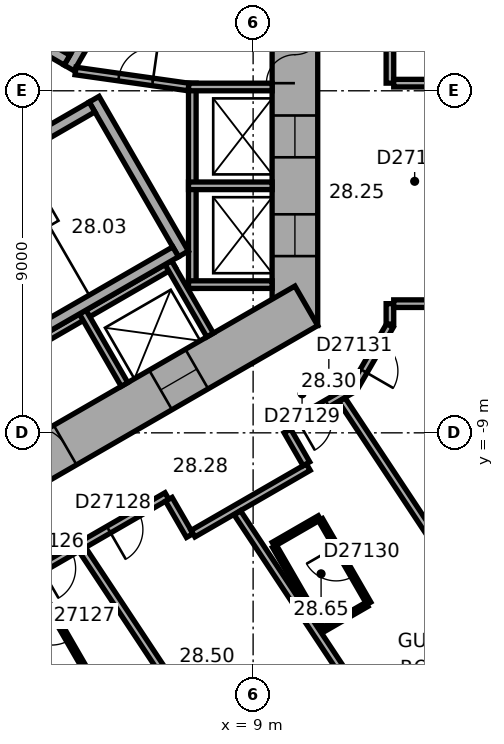
"""IFC4 building model, lengths in metres.
Left out: names, types, materials, properties, quantities, classifications, styles, units other than length and angle.
Written with IfcOpenShell. Run it as: python <this file> out.ifc"""

import sys

from ifc_helpers import new_model, si_unit, direction, frame, frame_2d, origin, place, context, subcontext, project, spatial, rectangle, extrude, element, fill, save


model = new_model("IFC4")
c1 = context("Model", 3, precision=1e-05, world=origin(), true_north=direction((0.0, 1.0)))
c2 = subcontext(c1, "Body", "Model", "MODEL_VIEW")
j1 = project(units=[si_unit("LENGTHUNIT", "METRE"), si_unit("PLANEANGLEUNIT", "RADIAN")], contexts=[c1])
p1 = place(None, origin())
s1 = spatial("IfcSite", under=j1, at=p1, CompositionType="ELEMENT")
p2 = place(p1, origin())
s2 = spatial("IfcBuilding", under=s1, at=p2, CompositionType="ELEMENT")
p3 = place(p2, frame((0.0, 0.0, 116.6)))
s3 = spatial("IfcBuildingStorey", under=s2, at=p3, CompositionType="ELEMENT", Elevation=116.6)
p4 = place(p3, frame((10.1, -6.177, 0.0), z_axis=(0.0, 0.0, 1.0), x_axis=(0.0, 1.0, 0.0)))
e1 = element("IfcWall", 1, at=p4, inside=s3, PredefinedType="SHEAR", context=c2, shape_type="SweptSolid", body=[
    extrude(rectangle(XDim=12.355, YDim=1.2, at=frame_2d((6.177, 0.0))), origin(), (0.0, 0.0, 1.0), 3.3),
])
p5 = place(p4, frame((6.378, 0.0, 0.0)))
e2 = element("IfcOpeningElement", 2, at=p5, cuts=e1, PredefinedType="OPENING", context=c2, shape_type="SweptSolid", body=[
    extrude(rectangle(XDim=1.5, YDim=2.1, at=frame_2d((0.75, 1.05))), frame((0.0, 0.61, 0.0), z_axis=(0.0, -1.0, 0.0), x_axis=(1.0, 0.0, 0.0)), (0.0, 0.0, 1.0), 1.22),
])
p6 = place(p4, frame((1.828, 0.0, 0.0)))
e3 = element("IfcOpeningElement", 3, at=p6, cuts=e1, PredefinedType="OPENING", context=c2, shape_type="SweptSolid", body=[
    extrude(rectangle(XDim=1.1, YDim=2.1, at=frame_2d((0.55, 1.05))), frame((0.0, 0.61, 0.0), z_axis=(0.0, -1.0, 0.0), x_axis=(1.0, 0.0, 0.0)), (0.0, 0.0, 1.0), 1.22),
])
p7 = place(p4, frame((4.427, 0.0, 0.0)))
e4 = element("IfcOpeningElement", 4, at=p7, cuts=e1, PredefinedType="OPENING", context=c2, shape_type="SweptSolid", body=[
    extrude(rectangle(XDim=1.1, YDim=2.1, at=frame_2d((0.55, 1.05))), frame((0.0, 0.61, 0.0), z_axis=(0.0, -1.0, 0.0), x_axis=(1.0, 0.0, 0.0)), (0.0, 0.0, 1.0), 1.22),
])
p8 = place(p3, frame((-0.3, -11.836, 0.0), z_axis=(0.0, 0.0, 1.0), x_axis=(0.866021384402, 0.500006961711, 0.0)))
e5 = element("IfcWall", 5, at=p8, inside=s3, PredefinedType="SHEAR", context=c2, shape_type="SweptSolid", body=[
    extrude(rectangle(XDim=12.355, YDim=1.2, at=frame_2d((6.178, 0.0))), origin(), (0.0, 0.0, 1.0), 3.3),
])
p9 = place(p8, frame((4.128, 0.0, 0.0)))
e6 = element("IfcOpeningElement", 6, at=p9, cuts=e5, PredefinedType="OPENING", context=c2, shape_type="SweptSolid", body=[
    extrude(rectangle(XDim=0.9, YDim=2.1, at=frame_2d((0.45, 1.05))), frame((0.0, 0.61, 0.0), z_axis=(0.0, -1.0, 0.0), x_axis=(1.0, 0.0, 0.0)), (0.0, 0.0, 1.0), 1.22),
])
p10 = place(p8, frame((7.928, 0.0, 0.0)))
e7 = element("IfcOpeningElement", 7, at=p10, cuts=e5, PredefinedType="OPENING", context=c2, shape_type="SweptSolid", body=[
    extrude(rectangle(XDim=1.1, YDim=2.1, at=frame_2d((0.55, 1.05))), frame((0.0, 0.61, 0.0), z_axis=(0.0, -1.0, 0.0), x_axis=(1.0, 0.0, 0.0)), (0.0, 0.0, 1.0), 1.22),
])
p11 = place(p3, frame((3.083, -25.601, 0.0), z_axis=(0.0, 0.0, 1.0), x_axis=(0.833884295743, 0.551939291329, 0.0)))
e8 = element("IfcWall", 8, at=p11, inside=s3, PredefinedType="STANDARD", context=c2, shape_type="SweptSolid", body=[
    extrude(rectangle(XDim=21.246, YDim=0.2, at=frame_2d((10.623, 0.0))), origin(), (0.0, 0.0, 1.0), 3.3),
])
p12 = place(p11, frame((1.553, 0.0, 0.8)))
e9 = element("IfcOpeningElement", 9, at=p12, cuts=e8, PredefinedType="OPENING", context=c2, shape_type="SweptSolid", body=[
    extrude(rectangle(XDim=2.4, YDim=1.7, at=frame_2d((1.2, 0.85))), frame((0.0, 0.11, 0.0), z_axis=(0.0, -1.0, 0.0), x_axis=(1.0, 0.0, 0.0)), (0.0, 0.0, 1.0), 0.22),
])
p13 = place(p11, frame((5.488, 0.0, 0.8)))
e10 = element("IfcOpeningElement", 10, at=p13, cuts=e8, PredefinedType="OPENING", context=c2, shape_type="SweptSolid", body=[
    extrude(rectangle(XDim=2.4, YDim=1.7, at=frame_2d((1.2, 0.85))), frame((0.0, 0.11, 0.0), z_axis=(0.0, -1.0, 0.0), x_axis=(1.0, 0.0, 0.0)), (0.0, 0.0, 1.0), 0.22),
])
p14 = place(p11, frame((9.422, 0.0, 0.8)))
e11 = element("IfcOpeningElement", 11, at=p14, cuts=e8, PredefinedType="OPENING", context=c2, shape_type="SweptSolid", body=[
    extrude(rectangle(XDim=2.4, YDim=1.7, at=frame_2d((1.2, 0.85))), frame((0.0, 0.11, 0.0), z_axis=(0.0, -1.0, 0.0), x_axis=(1.0, 0.0, 0.0)), (0.0, 0.0, 1.0), 0.22),
])
p15 = place(p11, frame((13.357, 0.0, 0.8)))
e12 = element("IfcOpeningElement", 12, at=p15, cuts=e8, PredefinedType="OPENING", context=c2, shape_type="SweptSolid", body=[
    extrude(rectangle(XDim=2.4, YDim=1.7, at=frame_2d((1.2, 0.85))), frame((0.0, 0.11, 0.0), z_axis=(0.0, -1.0, 0.0), x_axis=(1.0, 0.0, 0.0)), (0.0, 0.0, 1.0), 0.22),
])
p16 = place(p11, frame((17.291, 0.0, 0.8)))
e13 = element("IfcOpeningElement", 13, at=p16, cuts=e8, PredefinedType="OPENING", context=c2, shape_type="SweptSolid", body=[
    extrude(rectangle(XDim=2.4, YDim=1.7, at=frame_2d((1.2, 0.85))), frame((0.0, 0.11, 0.0), z_axis=(0.0, -1.0, 0.0), x_axis=(1.0, 0.0, 0.0)), (0.0, 0.0, 1.0), 0.22),
])
p17 = place(p3, frame((7.4, -5.2, 0.0), z_axis=(0.0, 0.0, 1.0), x_axis=(0.0, 1.0, 0.0)))
e14 = element("IfcWall", 14, at=p17, inside=s3, PredefinedType="PARTITIONING", context=c2, shape_type="SweptSolid", body=[
    extrude(rectangle(XDim=5.4, YDim=0.2, at=frame_2d((2.7, 0.0))), origin(), (0.0, 0.0, 1.0), 2.95),
])
for number, where, z_axis, x_axis in (
    (15, (7.3, -5.1, 0.0), (0.0, 0.0, 1.0), (1.0, 0.0, 0.0)),
    (16, (7.3, -2.5, 0.0), (0.0, 0.0, 1.0), (1.0, 0.0, 0.0)),
    (17, (7.3, 0.1, 0.0), (0.0, 0.0, 1.0), (1.0, 0.0, 0.0)),
):
    element("IfcWall", number, at=place(p3, frame(where, z_axis=z_axis, x_axis=x_axis)), inside=s3, PredefinedType="PARTITIONING", context=c2, shape_type="SweptSolid", body=[
        extrude(rectangle(XDim=2.2, YDim=0.2, at=frame_2d((1.1, 0.0))), origin(), (0.0, 0.0, 1.0), 2.95),
    ])
p18 = place(p3, frame((-0.024, -8.559, 0.0), z_axis=(0.0, 0.0, 1.0), x_axis=(0.866026010844, 0.49999894854, 0.0)))
e18 = element("IfcWall", 18, at=p18, inside=s3, PredefinedType="PARTITIONING", context=c2, shape_type="SweptSolid", body=[
    extrude(rectangle(XDim=8.0, YDim=0.2, at=frame_2d((4.0, 0.0))), origin(), (0.0, 0.0, 1.0), 2.95),
])
for number, where, z_axis, x_axis in (
    (19, (4.516, -5.822, 0.0), (0.0, 0.0, 1.0), (0.5, -0.866, 0.0)),
    (20, (6.768, -4.522, 0.0), (0.0, 0.0, 1.0), (0.5, -0.866, 0.0)),
):
    element("IfcWall", number, at=place(p3, frame(where, z_axis=z_axis, x_axis=x_axis)), inside=s3, PredefinedType="PARTITIONING", context=c2, shape_type="SweptSolid", body=[
        extrude(rectangle(XDim=2.2, YDim=0.2, at=frame_2d((1.1, 0.0))), origin(), (0.0, 0.0, 1.0), 2.95),
    ])
p19 = place(p3, frame((4.158, 0.602, 0.0), z_axis=(0.0, 0.0, 1.0), x_axis=(0.499977259774, 0.866038532462, 0.0)))
e21 = element("IfcWall", 21, at=p19, inside=s3, PredefinedType="SHEAR", context=c2, shape_type="SweptSolid", body=[
    extrude(rectangle(XDim=4.7, YDim=0.3, at=frame_2d((2.35, 0.0))), origin(), (0.0, 0.0, 1.0), 2.95),
])
p20 = place(p19, frame((0.8, 0.0, 0.0)))
e22 = element("IfcOpeningElement", 22, at=p20, cuts=e21, PredefinedType="OPENING", context=c2, shape_type="SweptSolid", body=[
    extrude(rectangle(XDim=1.2, YDim=2.1, at=frame_2d((0.6, 1.05))), frame((0.0, 0.16, 0.0), z_axis=(0.0, -1.0, 0.0), x_axis=(1.0, 0.0, 0.0)), (0.0, 0.0, 1.0), 0.32),
])
p21 = place(p3, frame((4.103, 0.807, 0.0), z_axis=(0.0, 0.0, 1.0), x_axis=(-0.866027801685, 0.499995846692, 0.0)))
e23 = element("IfcWall", 23, at=p21, inside=s3, PredefinedType="SHEAR", context=c2, shape_type="SweptSolid", body=[
    extrude(rectangle(XDim=7.06, YDim=0.3, at=frame_2d((3.53, 0.0))), origin(), (0.0, 0.0, 1.0), 2.95),
])
p22 = place(p3, frame((4.816, -0.222, 0.0), z_axis=(0.0, 0.0, 1.0), x_axis=(0.499977259774, -0.866038532462, 0.0)))
e24 = element("IfcWall", 24, at=p22, inside=s3, PredefinedType="SHEAR", context=c2, shape_type="SweptSolid", body=[
    extrude(rectangle(XDim=4.7, YDim=0.3, at=frame_2d((2.35, 0.0))), origin(), (0.0, 0.0, 1.0), 2.95),
])
for number, where, z_axis, x_axis in (
    (25, (-1.353, -3.957, 0.0), (0.0, 0.0, 1.0), (0.866, 0.5, 0.0)),
    (26, (0.847, -7.767, 0.0), (0.0, 0.0, 1.0), (0.866, 0.5, 0.0)),
):
    element("IfcWall", number, at=place(p3, frame(where, z_axis=z_axis, x_axis=x_axis)), inside=s3, PredefinedType="SHEAR", context=c2, shape_type="SweptSolid", body=[
        extrude(rectangle(XDim=7.06, YDim=0.3, at=frame_2d((3.53, 0.0))), origin(), (0.0, 0.0, 1.0), 2.95),
    ])
p23 = place(p3, frame((4.327, 0.521, 0.0), z_axis=(0.0, 0.0, 1.0), x_axis=(0.990124376366, -0.14019172346, 0.0)))
e27 = element("IfcWall", 27, at=p23, inside=s3, PredefinedType="PARTITIONING", context=c2, shape_type="SweptSolid", body=[
    extrude(rectangle(XDim=3.002, YDim=0.2, at=frame_2d((1.501, 0.0))), origin(), (0.0, 0.0, 1.0), 2.95),
])
p24 = place(p23, frame((1.15, 0.0, 0.0)))
e28 = element("IfcOpeningElement", 28, at=p24, cuts=e27, PredefinedType="OPENING", context=c2, shape_type="SweptSolid", body=[
    extrude(rectangle(XDim=0.9, YDim=2.1, at=frame_2d((0.45, 1.05))), frame((0.0, 0.11, 0.0), z_axis=(0.0, -1.0, 0.0), x_axis=(1.0, 0.0, 0.0)), (0.0, 0.0, 1.0), 0.22),
])
p25 = place(p3, frame((1.033, -13.953, 0.0), z_axis=(0.0, 0.0, 1.0), x_axis=(0.866017531406, 0.500013635111, 0.0)))
e29 = element("IfcWall", 29, at=p25, inside=s3, PredefinedType="PARTITIONING", context=c2, shape_type="SweptSolid", body=[
    extrude(rectangle(XDim=6.58, YDim=0.2, at=frame_2d((3.29, 0.0))), origin(), (0.0, 0.0, 1.0), 2.95),
])
p26 = place(p25, frame((2.767, 0.0, 0.0)))
e30 = element("IfcOpeningElement", 30, at=p26, cuts=e29, PredefinedType="OPENING", context=c2, shape_type="SweptSolid", body=[
    extrude(rectangle(XDim=0.9, YDim=2.1, at=frame_2d((0.45, 1.05))), frame((0.0, 0.11, 0.0), z_axis=(0.0, -1.0, 0.0), x_axis=(1.0, 0.0, 0.0)), (0.0, 0.0, 1.0), 0.22),
])
p27 = place(p25, frame((4.811, 0.0, 0.0)))
e31 = element("IfcOpeningElement", 31, at=p27, cuts=e29, PredefinedType="OPENING", context=c2, shape_type="SweptSolid", body=[
    extrude(rectangle(XDim=0.9, YDim=2.1, at=frame_2d((0.45, 1.05))), frame((0.0, 0.11, 0.0), z_axis=(0.0, -1.0, 0.0), x_axis=(1.0, 0.0, 0.0)), (0.0, 0.0, 1.0), 0.22),
])
p28 = place(p3, frame((3.198, -12.818, 0.0), z_axis=(0.0, 0.0, 1.0), x_axis=(0.499987231761, -0.866032775405, 0.0)))
e32 = element("IfcWall", 32, at=p28, inside=s3, PredefinedType="PARTITIONING", context=c2, shape_type="SweptSolid", body=[
    extrude(rectangle(XDim=2.9, YDim=0.12, at=frame_2d((1.45, 0.0))), origin(), (0.0, 0.0, 1.0), 2.95),
])
p29 = place(p28, frame((1.0, 0.0, 0.0)))
e33 = element("IfcOpeningElement", 33, at=p29, cuts=e32, PredefinedType="OPENING", context=c2, shape_type="SweptSolid", body=[
    extrude(rectangle(XDim=0.9, YDim=2.1, at=frame_2d((0.45, 1.05))), frame((0.0, 0.07, 0.0), z_axis=(0.0, -1.0, 0.0), x_axis=(1.0, 0.0, 0.0)), (0.0, 0.0, 1.0), 0.14),
])
p30 = place(p3, frame((6.412, -22.079, 0.0), z_axis=(0.0, 0.0, 1.0), x_axis=(-0.551919507115, 0.83389739037, 0.0)))
e34 = element("IfcWall", 34, at=p30, inside=s3, PredefinedType="PARTITIONING", context=c2, shape_type="SweptSolid", body=[
    extrude(rectangle(XDim=9.635, YDim=0.2, at=frame_2d((4.817, 0.0))), origin(), (0.0, 0.0, 1.0), 2.95),
])
p31 = place(p3, frame((6.782, -10.749, 0.0), z_axis=(0.0, 0.0, 1.0), x_axis=(0.500074377092, -0.865982457891, 0.0)))
e35 = element("IfcWall", 35, at=p31, inside=s3, PredefinedType="PARTITIONING", context=c2, shape_type="SweptSolid", body=[
    extrude(rectangle(XDim=1.101, YDim=0.2, at=frame_2d((0.55, 0.0))), origin(), (0.0, 0.0, 1.0), 2.95),
])
p32 = place(p3, frame((7.419, -11.653, 0.0), z_axis=(0.0, 0.0, 1.0), x_axis=(0.866038154057, 0.49997791523, 0.0)))
e36 = element("IfcWall", 36, at=p32, inside=s3, PredefinedType="PARTITIONING", context=c2, shape_type="SweptSolid", body=[
    extrude(rectangle(XDim=3.502, YDim=0.2, at=frame_2d((1.751, 0.0))), origin(), (0.0, 0.0, 1.0), 2.95),
])
p33 = place(p3, frame((9.532, -11.934, 0.0), z_axis=(0.0, 0.0, 1.0), x_axis=(0.866034573852, 0.49998411664, 0.0)))
e37 = element("IfcWall", 37, at=p33, inside=s3, PredefinedType="PARTITIONING", context=c2, shape_type="SweptSolid", body=[
    extrude(rectangle(XDim=1.4, YDim=0.12, at=frame_2d((0.7, 0.0))), origin(), (0.0, 0.0, 1.0), 2.95),
])
p34 = place(p3, frame((9.693, -19.907, 0.0), z_axis=(0.0, 0.0, 1.0), x_axis=(-0.551938394837, 0.833884889121, 0.0)))
e38 = element("IfcWall", 38, at=p34, inside=s3, PredefinedType="PARTITIONING", context=c2, shape_type="SweptSolid", body=[
    extrude(rectangle(XDim=9.394, YDim=0.2, at=frame_2d((4.697, 0.0))), origin(), (0.0, 0.0, 1.0), 2.15),
])
p35 = place(p3, frame((9.852, -8.861, 0.0), z_axis=(0.0, 0.0, 1.0), x_axis=(0.866013291437, 0.500020978615, 0.0)))
e39 = element("IfcWall", 39, at=p35, inside=s3, PredefinedType="PARTITIONING", context=c2, shape_type="SweptSolid", body=[
    extrude(rectangle(XDim=2.077, YDim=0.2, at=frame_2d((1.038, 0.0))), origin(), (0.0, 0.0, 1.0), 2.95),
])
p36 = place(p35, frame((0.372, 0.0, 0.0)))
e40 = element("IfcOpeningElement", 40, at=p36, cuts=e39, PredefinedType="OPENING", context=c2, shape_type="SweptSolid", body=[
    extrude(rectangle(XDim=0.9, YDim=2.1, at=frame_2d((0.45, 1.05))), frame((0.0, 0.11, 0.0), z_axis=(0.0, -1.0, 0.0), x_axis=(1.0, 0.0, 0.0)), (0.0, 0.0, 1.0), 0.22),
])
p37 = place(p3, frame((10.402, -9.815, 0.0), z_axis=(0.0, 0.0, 1.0), x_axis=(-0.499968756647, 0.866043441391, 0.0)))
e41 = element("IfcWall", 41, at=p37, inside=s3, PredefinedType="PARTITIONING", context=c2, shape_type="SweptSolid", body=[
    extrude(rectangle(XDim=1.001, YDim=0.2, at=frame_2d((0.5, 0.0))), origin(), (0.0, 0.0, 1.0), 2.95),
])
p38 = place(p3, frame((10.775, -11.286, 0.0), z_axis=(0.0, 0.0, 1.0), x_axis=(0.500046963369, -0.865998287773, 0.0)))
e42 = element("IfcWall", 42, at=p38, inside=s3, PredefinedType="PARTITIONING", context=c2, shape_type="SweptSolid", body=[
    extrude(rectangle(XDim=2.54, YDim=0.12, at=frame_2d((1.27, 0.0))), origin(), (0.0, 0.0, 1.0), 2.95),
])
p39 = place(p38, frame((0.82, 0.0, 0.0)))
e43 = element("IfcOpeningElement", 43, at=p39, cuts=e42, PredefinedType="OPENING", context=c2, shape_type="SweptSolid", body=[
    extrude(rectangle(XDim=0.9, YDim=2.1, at=frame_2d((0.45, 1.05))), frame((0.0, 0.07, 0.0), z_axis=(0.0, -1.0, 0.0), x_axis=(1.0, 0.0, 0.0)), (0.0, 0.0, 1.0), 0.14),
])
p40 = place(p3, frame((10.833, -14.185, 0.0), z_axis=(0.0, 0.0, 1.0), x_axis=(-0.500005339912, 0.866022320763, 0.0)))
e44 = element("IfcWall", 44, at=p40, inside=s3, PredefinedType="PARTITIONING", context=c2, shape_type="SweptSolid", body=[
    extrude(rectangle(XDim=2.54, YDim=0.12, at=frame_2d((1.27, 0.0))), origin(), (0.0, 0.0, 1.0), 2.95),
])
p41 = place(p3, frame((11.67, -7.788, 0.0), z_axis=(0.0, 0.0, 1.0), x_axis=(0.500063286585, 0.865988862174, 0.0)))
e45 = element("IfcWall", 45, at=p41, inside=s3, PredefinedType="PARTITIONING", context=c2, shape_type="SweptSolid", body=[
    extrude(rectangle(XDim=1.86, YDim=0.2, at=frame_2d((0.93, 0.0))), origin(), (0.0, 0.0, 1.0), 2.95),
])
p42 = place(p41, frame((0.48, 0.0, 0.0)))
e46 = element("IfcOpeningElement", 46, at=p42, cuts=e45, PredefinedType="OPENING", context=c2, shape_type="SweptSolid", body=[
    extrude(rectangle(XDim=0.9, YDim=2.1, at=frame_2d((0.45, 1.05))), frame((0.0, 0.11, 0.0), z_axis=(0.0, -1.0, 0.0), x_axis=(1.0, 0.0, 0.0)), (0.0, 0.0, 1.0), 0.22),
])
p43 = place(p3, frame((11.993, -13.515, 0.0), z_axis=(0.0, 0.0, 1.0), x_axis=(-0.865956862152, -0.500118698802, 0.0)))
e47 = element("IfcWall", 47, at=p43, inside=s3, PredefinedType="PARTITIONING", context=c2, shape_type="SweptSolid", body=[
    extrude(rectangle(XDim=1.28, YDim=0.12, at=frame_2d((0.64, 0.0))), origin(), (0.0, 0.0, 1.0), 2.95),
])
p44 = place(p3, frame((12.6, -6.138, 0.0), z_axis=(0.0, 0.0, 1.0), x_axis=(0.0, 1.0, 0.0)))
e48 = element("IfcWall", 48, at=p44, inside=s3, PredefinedType="PARTITIONING", context=c2, shape_type="SweptSolid", body=[
    extrude(rectangle(XDim=0.537, YDim=0.2, at=frame_2d((0.268, 0.0))), origin(), (0.0, 0.0, 1.0), 2.95),
])
p45 = place(p3, frame((12.6, 0.201, 0.0), z_axis=(0.0, 0.0, 1.0), x_axis=(0.0, 1.0, 0.0)))
e49 = element("IfcWall", 49, at=p45, inside=s3, PredefinedType="PARTITIONING", context=c2, shape_type="SweptSolid", body=[
    extrude(rectangle(XDim=2.604, YDim=0.2, at=frame_2d((1.302, 0.0))), origin(), (0.0, 0.0, 1.0), 2.95),
])
p46 = place(p3, frame((12.7, -5.601, 0.0), z_axis=(0.0, 0.0, 1.0), x_axis=(1.0, 0.0, 0.0)))
e50 = element("IfcWall", 50, at=p46, inside=s3, PredefinedType="PARTITIONING", context=c2, shape_type="SweptSolid", body=[
    extrude(rectangle(XDim=1.101, YDim=0.2, at=frame_2d((0.551, 0.0))), origin(), (0.0, 0.0, 1.0), 2.95),
])
p47 = place(p3, frame((12.974, -17.735, 0.0), z_axis=(0.0, 0.0, 1.0), x_axis=(-0.55192625685, 0.833892922982, 0.0)))
e51 = element("IfcWall", 51, at=p47, inside=s3, PredefinedType="PARTITIONING", context=c2, shape_type="SweptSolid", body=[
    extrude(rectangle(XDim=7.95, YDim=0.2, at=frame_2d((3.975, 0.0))), origin(), (0.0, 0.0, 1.0), 2.95),
])
p48 = place(p3, frame((13.701, 0.201, 0.0), z_axis=(0.0, 0.0, 1.0), x_axis=(-1.0, 0.0, 0.0)))
e52 = element("IfcWall", 52, at=p48, inside=s3, PredefinedType="PARTITIONING", context=c2, shape_type="SweptSolid", body=[
    extrude(rectangle(XDim=1.001, YDim=0.2, at=frame_2d((0.5, 0.0))), origin(), (0.0, 0.0, 1.0), 2.95),
])
p49 = place(p3, frame((16.255, -15.564, 0.0), z_axis=(0.0, 0.0, 1.0), x_axis=(-0.55192208744, 0.833895682562, 0.0)))
e53 = element("IfcWall", 53, at=p49, inside=s3, PredefinedType="PARTITIONING", context=c2, shape_type="SweptSolid", body=[
    extrude(rectangle(XDim=8.913, YDim=0.2, at=frame_2d((4.457, 0.0))), origin(), (0.0, 0.0, 1.0), 2.15),
])
p50 = place(p5, origin())
e54 = element("IfcDoor", 54, at=p50, inside=s3, OperationType="DOUBLE_DOOR_SINGLE_SWING", PredefinedType="DOOR", context=c2, shape_type="SweptSolid", body=[
    extrude(rectangle(XDim=1.5, YDim=2.1, at=frame_2d((0.75, 1.05))), frame((0.0, 0.025, 0.0), z_axis=(0.0, -1.0, 0.0), x_axis=(1.0, 0.0, 0.0)), (0.0, 0.0, 1.0), 0.05),
])
fill(e2, e54)
p51 = place(p24, origin())
e55 = element("IfcDoor", 55, at=p51, inside=s3, OperationType="SINGLE_SWING_LEFT", PredefinedType="DOOR", context=c2, shape_type="SweptSolid", body=[
    extrude(rectangle(XDim=0.9, YDim=2.1, at=frame_2d((0.45, 1.05))), frame((0.0, 0.025, 0.0), z_axis=(0.0, -1.0, 0.0), x_axis=(1.0, 0.0, 0.0)), (0.0, 0.0, 1.0), 0.05),
])
fill(e28, e55)
p52 = place(p9, origin())
e56 = element("IfcDoor", 56, at=p52, inside=s3, OperationType="SINGLE_SWING_LEFT", PredefinedType="DOOR", context=c2, shape_type="SweptSolid", body=[
    extrude(rectangle(XDim=0.9, YDim=2.1, at=frame_2d((0.45, 1.05))), frame((0.0, 0.025, 0.0), z_axis=(0.0, -1.0, 0.0), x_axis=(1.0, 0.0, 0.0)), (0.0, 0.0, 1.0), 0.05),
])
fill(e6, e56)
p53 = place(p6, origin())
e57 = element("IfcDoor", 57, at=p53, inside=s3, OperationType="DOUBLE_DOOR_SLIDING", PredefinedType="DOOR", context=c2, shape_type="SweptSolid", body=[
    extrude(rectangle(XDim=1.1, YDim=2.1, at=frame_2d((0.55, 1.05))), frame((0.0, 0.025, 0.0), z_axis=(0.0, -1.0, 0.0), x_axis=(1.0, 0.0, 0.0)), (0.0, 0.0, 1.0), 0.05),
])
fill(e3, e57)
p54 = place(p7, origin())
e58 = element("IfcDoor", 58, at=p54, inside=s3, OperationType="DOUBLE_DOOR_SLIDING", PredefinedType="DOOR", context=c2, shape_type="SweptSolid", body=[
    extrude(rectangle(XDim=1.1, YDim=2.1, at=frame_2d((0.55, 1.05))), frame((0.0, 0.025, 0.0), z_axis=(0.0, -1.0, 0.0), x_axis=(1.0, 0.0, 0.0)), (0.0, 0.0, 1.0), 0.05),
])
fill(e4, e58)
p55 = place(p10, origin())
e59 = element("IfcDoor", 59, at=p55, inside=s3, OperationType="DOUBLE_DOOR_SLIDING", PredefinedType="DOOR", context=c2, shape_type="SweptSolid", body=[
    extrude(rectangle(XDim=1.1, YDim=2.1, at=frame_2d((0.55, 1.05))), frame((0.0, 0.025, 0.0), z_axis=(0.0, -1.0, 0.0), x_axis=(1.0, 0.0, 0.0)), (0.0, 0.0, 1.0), 0.05),
])
fill(e7, e59)
p56 = place(p26, origin())
e60 = element("IfcDoor", 60, at=p56, inside=s3, OperationType="SINGLE_SWING_LEFT", PredefinedType="DOOR", context=c2, shape_type="SweptSolid", body=[
    extrude(rectangle(XDim=0.9, YDim=2.1, at=frame_2d((0.45, 1.05))), frame((0.0, 0.025, 0.0), z_axis=(0.0, -1.0, 0.0), x_axis=(1.0, 0.0, 0.0)), (0.0, 0.0, 1.0), 0.05),
])
fill(e30, e60)
p57 = place(p29, origin())
e61 = element("IfcDoor", 61, at=p57, inside=s3, OperationType="SINGLE_SWING_LEFT", PredefinedType="DOOR", context=c2, shape_type="SweptSolid", body=[
    extrude(rectangle(XDim=0.9, YDim=2.1, at=frame_2d((0.45, 1.05))), frame((0.0, 0.025, 0.0), z_axis=(0.0, -1.0, 0.0), x_axis=(1.0, 0.0, 0.0)), (0.0, 0.0, 1.0), 0.05),
])
fill(e33, e61)
p58 = place(p27, origin())
e62 = element("IfcDoor", 62, at=p58, inside=s3, OperationType="SINGLE_SWING_LEFT", PredefinedType="DOOR", context=c2, shape_type="SweptSolid", body=[
    extrude(rectangle(XDim=0.9, YDim=2.1, at=frame_2d((0.45, 1.05))), frame((0.0, 0.025, 0.0), z_axis=(0.0, -1.0, 0.0), x_axis=(1.0, 0.0, 0.0)), (0.0, 0.0, 1.0), 0.05),
])
fill(e31, e62)
p59 = place(p36, origin())
e63 = element("IfcDoor", 63, at=p59, inside=s3, OperationType="SINGLE_SWING_LEFT", PredefinedType="DOOR", context=c2, shape_type="SweptSolid", body=[
    extrude(rectangle(XDim=0.9, YDim=2.1, at=frame_2d((0.45, 1.05))), frame((0.0, 0.025, 0.0), z_axis=(0.0, -1.0, 0.0), x_axis=(1.0, 0.0, 0.0)), (0.0, 0.0, 1.0), 0.05),
])
fill(e40, e63)
p60 = place(p39, origin())
e64 = element("IfcDoor", 64, at=p60, inside=s3, OperationType="SINGLE_SWING_LEFT", PredefinedType="DOOR", context=c2, shape_type="SweptSolid", body=[
    extrude(rectangle(XDim=0.9, YDim=2.1, at=frame_2d((0.45, 1.05))), frame((0.0, 0.025, 0.0), z_axis=(0.0, -1.0, 0.0), x_axis=(1.0, 0.0, 0.0)), (0.0, 0.0, 1.0), 0.05),
])
fill(e43, e64)
p61 = place(p42, origin())
e65 = element("IfcDoor", 65, at=p61, inside=s3, OperationType="SINGLE_SWING_LEFT", PredefinedType="DOOR", context=c2, shape_type="SweptSolid", body=[
    extrude(rectangle(XDim=0.9, YDim=2.1, at=frame_2d((0.45, 1.05))), frame((0.0, 0.025, 0.0), z_axis=(0.0, -1.0, 0.0), x_axis=(1.0, 0.0, 0.0)), (0.0, 0.0, 1.0), 0.05),
])
fill(e46, e65)
save(model, sys.argv[1])
